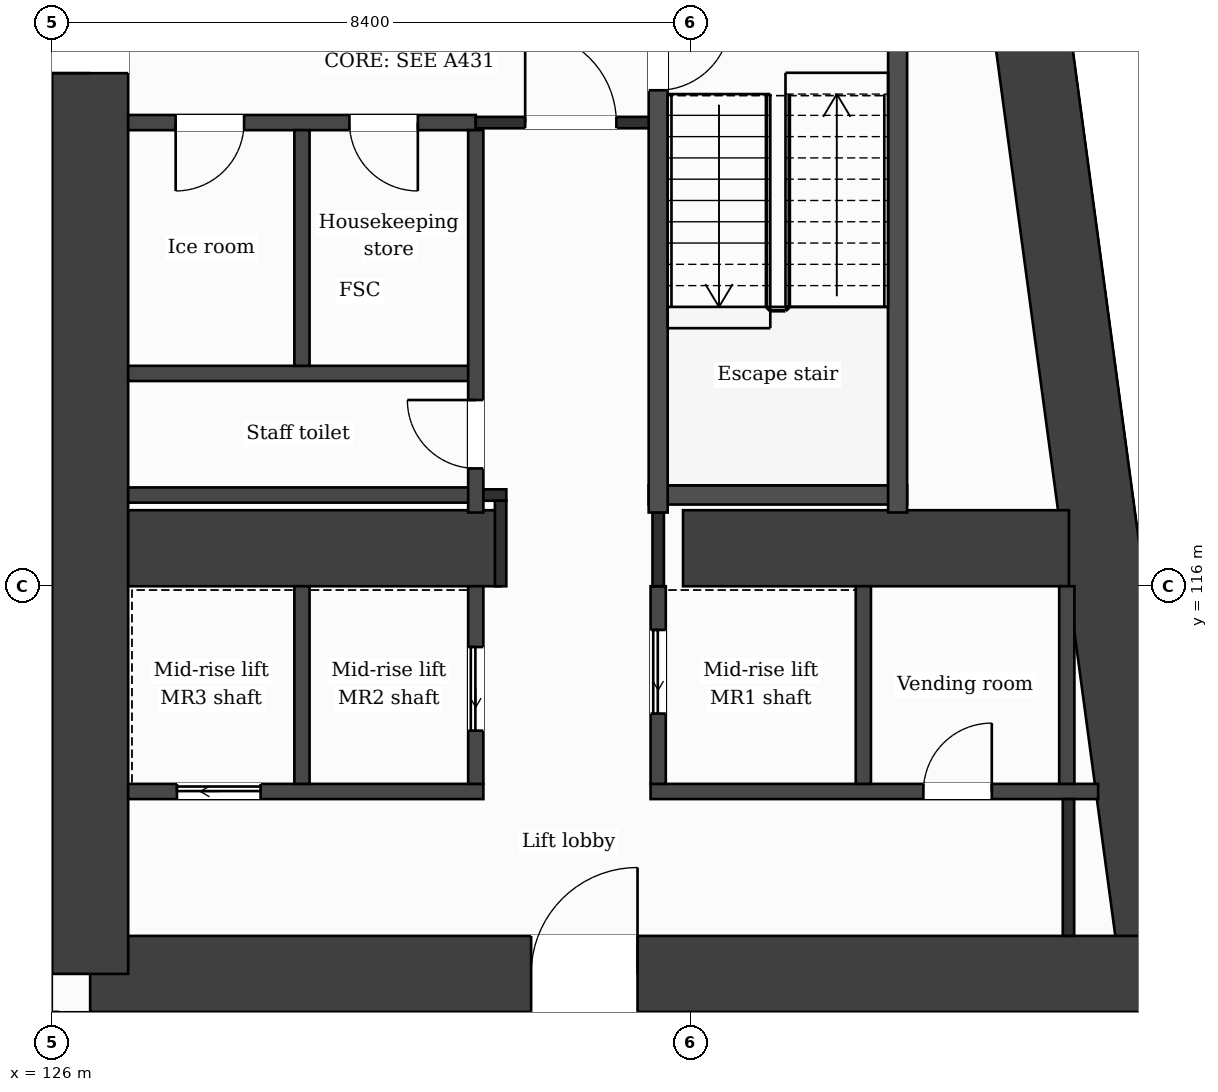
"""IFC4 building model, lengths in metres.
Left out: names, types, materials, properties, quantities, classifications, styles, units other than length and angle.
Written with IfcOpenShell. Run it as: python <this file> out.ifc"""

import sys

from ifc_helpers import new_model, si_unit, direction, frame, frame_2d, origin, place, context, subcontext, project, spatial, rectangle, extrude, element, fill, save


model = new_model("IFC4")
c1 = context("Model", 3, precision=1e-05, world=origin(), true_north=direction((0.0, 1.0)))
c2 = subcontext(c1, "Body", "Model", "MODEL_VIEW")
j1 = project(units=[si_unit("LENGTHUNIT", "METRE"), si_unit("PLANEANGLEUNIT", "RADIAN")], contexts=[c1])
p1 = place(None, origin())
s1 = spatial("IfcSite", under=j1, at=p1, CompositionType="ELEMENT")
p2 = place(p1, origin())
s2 = spatial("IfcBuilding", under=s1, at=p2, CompositionType="ELEMENT")
p3 = place(p2, frame((0.0, 0.0, 128.0)))
s3 = spatial("IfcBuildingStorey", under=s2, at=p3, CompositionType="ELEMENT", Elevation=128.0)
p4 = place(p3, frame((137.732, 131.9, 0.0), z_axis=(0.0, 0.0, 1.0), x_axis=(0.133411141623, -0.991060778808, 0.0)))
e1 = element("IfcWall", 1, at=p4, inside=s3, PredefinedType="SHEAR", context=c2, shape_type="SweptSolid", body=[
    extrude(rectangle(XDim=21.189, YDim=1.0, at=frame_2d((10.595, 0.0))), origin(), (0.0, 0.0, 1.0), 3.7),
])
p5 = place(p3, frame((140.559, 110.9, 0.0), z_axis=(0.0, 0.0, 1.0), x_axis=(-1.0, 0.0, 0.0)))
e2 = element("IfcWall", 2, at=p5, inside=s3, PredefinedType="SHEAR", context=c2, shape_type="SweptSolid", body=[
    extrude(rectangle(XDim=14.059, YDim=1.0, at=frame_2d((7.029, 0.0))), origin(), (0.0, 0.0, 1.0), 3.7),
])
p6 = place(p5, frame((6.858, 0.0, 0.0)))
e3 = element("IfcOpeningElement", 3, at=p6, cuts=e2, PredefinedType="OPENING", context=c2, shape_type="SweptSolid", body=[
    extrude(rectangle(XDim=1.4, YDim=2.1, at=frame_2d((0.7, 1.05))), frame((0.0, 0.51, 0.0), z_axis=(0.0, -1.0, 0.0), x_axis=(1.0, 0.0, 0.0)), (0.0, 0.0, 1.0), 1.02),
])
p7 = place(p3, frame((126.5, 110.9, 0.0), z_axis=(0.0, 0.0, 1.0), x_axis=(0.0, 1.0, 0.0)))
e4 = element("IfcWall", 4, at=p7, inside=s3, PredefinedType="SHEAR", context=c2, shape_type="SweptSolid", body=[
    extrude(rectangle(XDim=21.0, YDim=1.0, at=frame_2d((10.5, 0.0))), origin(), (0.0, 0.0, 1.0), 3.7),
])
p8 = place(p7, frame((11.85, 0.0, 0.0)))
e5 = element("IfcOpeningElement", 5, at=p8, cuts=e4, PredefinedType="OPENING", context=c2, shape_type="SweptSolid", body=[
    extrude(rectangle(XDim=1.4, YDim=2.1, at=frame_2d((0.7, 1.05))), frame((0.0, 0.51, 0.0), z_axis=(0.0, -1.0, 0.0), x_axis=(1.0, 0.0, 0.0)), (0.0, 0.0, 1.0), 1.02),
])
p9 = place(p3, frame((127.0, 116.5, 0.0), z_axis=(0.0, 0.0, 1.0), x_axis=(1.0, 0.0, 0.0)))
e6 = element("IfcWall", 6, at=p9, inside=s3, PredefinedType="SHEAR", context=c2, shape_type="SweptSolid", body=[
    extrude(rectangle(XDim=4.9, YDim=1.0, at=frame_2d((2.45, 0.0))), origin(), (0.0, 0.0, 1.0), 3.7),
])
p10 = place(p3, frame((134.3, 116.5, 0.0), z_axis=(0.0, 0.0, 1.0), x_axis=(1.0, 0.0, 0.0)))
e7 = element("IfcWall", 7, at=p10, inside=s3, PredefinedType="SHEAR", context=c2, shape_type="SweptSolid", body=[
    extrude(rectangle(XDim=5.077, YDim=1.0, at=frame_2d((2.539, 0.0))), origin(), (0.0, 0.0, 1.0), 3.7),
])
p11 = place(p3, frame((140.348, 103.85, 0.0), z_axis=(0.0, 0.0, 1.0), x_axis=(-0.133431549479, 0.991058031401, 0.0)))
e8 = element("IfcWall", 8, at=p11, inside=s3, PredefinedType="SOLIDWALL", context=c2, shape_type="SweptSolid", body=[
    extrude(rectangle(XDim=6.609, YDim=0.3, at=frame_2d((3.304, 0.0))), origin(), (0.0, 0.0, 1.0), 3.38),
])
p12 = place(p11, frame((0.737, 0.0, 0.9)))
e9 = element("IfcOpeningElement", 9, at=p12, cuts=e8, PredefinedType="OPENING", context=c2, shape_type="SweptSolid", body=[
    extrude(rectangle(XDim=1.2, YDim=2.1, at=frame_2d((0.6, 1.05))), frame((0.0, 0.16, 0.0), z_axis=(0.0, -1.0, 0.0), x_axis=(1.0, 0.0, 0.0)), (0.0, 0.0, 1.0), 0.32),
])
p13 = place(p11, frame((3.991, 0.0, 0.0)))
e10 = element("IfcOpeningElement", 10, at=p13, cuts=e8, PredefinedType="OPENING", context=c2, shape_type="SweptSolid", body=[
    extrude(rectangle(XDim=1.2, YDim=2.4, at=frame_2d((0.6, 1.2))), frame((0.0, 0.16, 0.0), z_axis=(0.0, -1.0, 0.0), x_axis=(1.0, 0.0, 0.0)), (0.0, 0.0, 1.0), 0.32),
])
p14 = place(p3, frame((127.0, 113.3, 0.0), z_axis=(0.0, 0.0, 1.0), x_axis=(1.0, 0.0, 0.0)))
e11 = element("IfcWall", 11, at=p14, inside=s3, PredefinedType="PARTITIONING", context=c2, shape_type="SweptSolid", body=[
    extrude(rectangle(XDim=4.673, YDim=0.2, at=frame_2d((2.336, 0.0))), origin(), (0.0, 0.0, 1.0), 3.38),
])
p15 = place(p14, frame((0.642, 0.0, 0.0)))
e12 = element("IfcOpeningElement", 12, at=p15, cuts=e11, PredefinedType="OPENING", context=c2, shape_type="SweptSolid", body=[
    extrude(rectangle(XDim=1.1, YDim=2.1, at=frame_2d((0.55, 1.05))), frame((0.0, 0.11, 0.0), z_axis=(0.0, -1.0, 0.0), x_axis=(1.0, 0.0, 0.0)), (0.0, 0.0, 1.0), 0.22),
])
p16 = place(p3, frame((133.873, 113.3, 0.0), z_axis=(0.0, 0.0, 1.0), x_axis=(1.0, 0.0, 0.0)))
e13 = element("IfcWall", 13, at=p16, inside=s3, PredefinedType="PARTITIONING", context=c2, shape_type="SweptSolid", body=[
    extrude(rectangle(XDim=5.888, YDim=0.2, at=frame_2d((2.944, 0.0))), origin(), (0.0, 0.0, 1.0), 3.38),
])
p17 = place(p16, frame((3.589, 0.0, 0.0)))
e14 = element("IfcOpeningElement", 14, at=p17, cuts=e13, PredefinedType="OPENING", context=c2, shape_type="SweptSolid", body=[
    extrude(rectangle(XDim=0.9, YDim=2.1, at=frame_2d((0.45, 1.05))), frame((0.0, 0.11, 0.0), z_axis=(0.0, -1.0, 0.0), x_axis=(1.0, 0.0, 0.0)), (0.0, 0.0, 1.0), 0.22),
])
p18 = place(p3, frame((127.0, 117.2, 0.0), z_axis=(0.0, 0.0, 1.0), x_axis=(1.0, 0.0, 0.0)))
e15 = element("IfcWall", 15, at=p18, inside=s3, PredefinedType="PARTITIONING", context=c2, shape_type="SweptSolid", body=[
    extrude(rectangle(XDim=4.573, YDim=0.2, at=frame_2d((2.287, 0.0))), origin(), (0.0, 0.0, 1.0), 3.38),
])
p19 = place(p3, frame((131.573, 117.2, 0.0), z_axis=(0.0, 0.0, 1.0), x_axis=(1.0, 0.0, 0.0)))
e16 = element("IfcWall", 16, at=p19, inside=s3, PredefinedType="PARTITIONING", context=c2, shape_type="SweptSolid", body=[
    extrude(rectangle(XDim=0.402, YDim=0.15, at=frame_2d((0.201, 0.0))), origin(), (0.0, 0.0, 1.0), 3.38),
])
p20 = place(p3, frame((133.848, 117.2, 0.0), z_axis=(0.0, 0.0, 1.0), x_axis=(1.0, 0.0, 0.0)))
e17 = element("IfcWall", 17, at=p20, inside=s3, PredefinedType="PARTITIONING", context=c2, shape_type="SweptSolid", body=[
    extrude(rectangle(XDim=3.4, YDim=0.25, at=frame_2d((1.7, 0.0))), origin(), (0.0, 0.0, 1.0), 3.38),
])
p21 = place(p3, frame((127.0, 118.8, 0.0), z_axis=(0.0, 0.0, 1.0), x_axis=(1.0, 0.0, 0.0)))
e18 = element("IfcWall", 18, at=p21, inside=s3, PredefinedType="PARTITIONING", context=c2, shape_type="SweptSolid", body=[
    extrude(rectangle(XDim=4.573, YDim=0.2, at=frame_2d((2.287, 0.0))), origin(), (0.0, 0.0, 1.0), 3.38),
])
p22 = place(p3, frame((127.0, 122.1, 0.0), z_axis=(0.0, 0.0, 1.0), x_axis=(1.0, 0.0, 0.0)))
e19 = element("IfcWall", 19, at=p22, inside=s3, PredefinedType="PARTITIONING", context=c2, shape_type="SweptSolid", body=[
    extrude(rectangle(XDim=4.573, YDim=0.2, at=frame_2d((2.287, 0.0))), origin(), (0.0, 0.0, 1.0), 3.38),
])
p23 = place(p22, frame((2.911, 0.0, 0.0)))
e20 = element("IfcOpeningElement", 20, at=p23, cuts=e19, PredefinedType="OPENING", context=c2, shape_type="SweptSolid", body=[
    extrude(rectangle(XDim=0.9, YDim=2.1, at=frame_2d((0.45, 1.05))), frame((0.0, 0.11, 0.0), z_axis=(0.0, -1.0, 0.0), x_axis=(1.0, 0.0, 0.0)), (0.0, 0.0, 1.0), 0.22),
])
p24 = place(p22, frame((0.625, 0.0, 0.0)))
e21 = element("IfcOpeningElement", 21, at=p24, cuts=e19, PredefinedType="OPENING", context=c2, shape_type="SweptSolid", body=[
    extrude(rectangle(XDim=0.9, YDim=2.1, at=frame_2d((0.45, 1.05))), frame((0.0, 0.11, 0.0), z_axis=(0.0, -1.0, 0.0), x_axis=(1.0, 0.0, 0.0)), (0.0, 0.0, 1.0), 0.22),
])
p25 = place(p3, frame((131.573, 122.1, 0.0), z_axis=(0.0, 0.0, 1.0), x_axis=(1.0, 0.0, 0.0)))
e22 = element("IfcWall", 22, at=p25, inside=s3, PredefinedType="PARTITIONING", context=c2, shape_type="SweptSolid", body=[
    extrude(rectangle(XDim=2.4, YDim=0.15, at=frame_2d((1.2, 0.0))), origin(), (0.0, 0.0, 1.0), 3.38),
])
p26 = place(p25, frame((0.65, 0.0, 0.0)))
e23 = element("IfcOpeningElement", 23, at=p26, cuts=e22, PredefinedType="OPENING", context=c2, shape_type="SweptSolid", body=[
    extrude(rectangle(XDim=1.2, YDim=2.1, at=frame_2d((0.6, 1.05))), frame((0.0, 0.085, 0.0), z_axis=(0.0, -1.0, 0.0), x_axis=(1.0, 0.0, 0.0)), (0.0, 0.0, 1.0), 0.17),
])
p27 = place(p3, frame((100.8, 122.45, 0.0), z_axis=(0.0, 0.0, 1.0), x_axis=(1.0, 0.0, 0.0)))
e24 = element("IfcWall", 24, at=p27, inside=s3, PredefinedType="PARTITIONING", context=c2, shape_type="SweptSolid", body=[
    extrude(rectangle(XDim=25.2, YDim=0.15, at=frame_2d((12.6, 0.0))), origin(), (0.0, 0.0, 1.0), 3.38),
])
p28 = place(p3, frame((126.0, 109.075, 0.0), z_axis=(0.0, 0.0, 1.0), x_axis=(0.0, 1.0, 0.0)))
e25 = element("IfcWall", 25, at=p28, inside=s3, PredefinedType="PARTITIONING", context=c2, shape_type="SweptSolid", body=[
    extrude(rectangle(XDim=1.325, YDim=0.15, at=frame_2d((0.663, 0.0))), origin(), (0.0, 0.0, 1.0), 3.38),
])
p29 = place(p3, frame((129.287, 113.4, 0.0), z_axis=(0.0, 0.0, 1.0), x_axis=(0.0, 1.0, 0.0)))
e26 = element("IfcWall", 26, at=p29, inside=s3, PredefinedType="PARTITIONING", context=c2, shape_type="SweptSolid", body=[
    extrude(rectangle(XDim=2.6, YDim=0.2, at=frame_2d((1.3, 0.0))), origin(), (0.0, 0.0, 1.0), 3.38),
])
p30 = place(p3, frame((129.287, 118.9, 0.0), z_axis=(0.0, 0.0, 1.0), x_axis=(0.0, 1.0, 0.0)))
e27 = element("IfcWall", 27, at=p30, inside=s3, PredefinedType="PARTITIONING", context=c2, shape_type="SweptSolid", body=[
    extrude(rectangle(XDim=3.1, YDim=0.2, at=frame_2d((1.55, 0.0))), origin(), (0.0, 0.0, 1.0), 3.38),
])
p31 = place(p3, frame((131.573, 113.4, 0.0), z_axis=(0.0, 0.0, 1.0), x_axis=(0.0, 1.0, 0.0)))
e28 = element("IfcWall", 28, at=p31, inside=s3, PredefinedType="PARTITIONING", context=c2, shape_type="SweptSolid", body=[
    extrude(rectangle(XDim=2.6, YDim=0.2, at=frame_2d((1.3, 0.0))), origin(), (0.0, 0.0, 1.0), 3.38),
])
p32 = place(p31, frame((0.7, 0.0, 0.0)))
e29 = element("IfcOpeningElement", 29, at=p32, cuts=e28, PredefinedType="OPENING", context=c2, shape_type="SweptSolid", body=[
    extrude(rectangle(XDim=1.1, YDim=2.1, at=frame_2d((0.55, 1.05))), frame((0.0, 0.11, 0.0), z_axis=(0.0, -1.0, 0.0), x_axis=(1.0, 0.0, 0.0)), (0.0, 0.0, 1.0), 0.22),
])
p33 = place(p3, frame((131.573, 116.97, 0.0), z_axis=(0.0, 0.0, 1.0), x_axis=(0.0, 1.0, 0.0)))
e30 = element("IfcWall", 30, at=p33, inside=s3, PredefinedType="PARTITIONING", context=c2, shape_type="SweptSolid", body=[
    extrude(rectangle(XDim=5.03, YDim=0.2, at=frame_2d((2.515, 0.0))), origin(), (0.0, 0.0, 1.0), 3.38),
])
p34 = place(p33, frame((0.58, 0.0, 0.0)))
e31 = element("IfcOpeningElement", 31, at=p34, cuts=e30, PredefinedType="OPENING", context=c2, shape_type="SweptSolid", body=[
    extrude(rectangle(XDim=0.9, YDim=2.1, at=frame_2d((0.45, 1.05))), frame((0.0, 0.11, 0.0), z_axis=(0.0, -1.0, 0.0), x_axis=(1.0, 0.0, 0.0)), (0.0, 0.0, 1.0), 0.22),
])
p35 = place(p3, frame((131.9, 116.0, 0.0), z_axis=(0.0, 0.0, 1.0), x_axis=(0.0, 1.0, 0.0)))
e32 = element("IfcWall", 32, at=p35, inside=s3, PredefinedType="PARTITIONING", context=c2, shape_type="SweptSolid", body=[
    extrude(rectangle(XDim=1.125, YDim=0.15, at=frame_2d((0.562, 0.0))), origin(), (0.0, 0.0, 1.0), 3.38),
])
p36 = place(p3, frame((133.973, 113.4, 0.0), z_axis=(0.0, 0.0, 1.0), x_axis=(0.0, 1.0, 0.0)))
e33 = element("IfcWall", 33, at=p36, inside=s3, PredefinedType="PARTITIONING", context=c2, shape_type="SweptSolid", body=[
    extrude(rectangle(XDim=2.6, YDim=0.2, at=frame_2d((1.3, 0.0))), origin(), (0.0, 0.0, 1.0), 3.38),
])
p37 = place(p36, frame((0.925, 0.0, 0.0)))
e34 = element("IfcOpeningElement", 34, at=p37, cuts=e33, PredefinedType="OPENING", context=c2, shape_type="SweptSolid", body=[
    extrude(rectangle(XDim=1.1, YDim=2.1, at=frame_2d((0.55, 1.05))), frame((0.0, 0.11, 0.0), z_axis=(0.0, -1.0, 0.0), x_axis=(1.0, 0.0, 0.0)), (0.0, 0.0, 1.0), 0.22),
])
p38 = place(p3, frame((133.973, 116.0, 0.0), z_axis=(0.0, 0.0, 1.0), x_axis=(0.0, 1.0, 0.0)))
e35 = element("IfcWall", 35, at=p38, inside=s3, PredefinedType="PARTITIONING", context=c2, shape_type="SweptSolid", body=[
    extrude(rectangle(XDim=0.97, YDim=0.15, at=frame_2d((0.485, 0.0))), origin(), (0.0, 0.0, 1.0), 3.38),
])
p39 = place(p3, frame((133.973, 116.97, 0.0), z_axis=(0.0, 0.0, 1.0), x_axis=(0.0, 1.0, 0.0)))
e36 = element("IfcWall", 36, at=p39, inside=s3, PredefinedType="PARTITIONING", context=c2, shape_type="SweptSolid", body=[
    extrude(rectangle(XDim=6.855, YDim=0.25, at=frame_2d((3.427, 0.0))), origin(), (0.0, 0.0, 1.0), 3.38),
])
p40 = place(p39, frame((5.555, 0.0, 0.0)))
e37 = element("IfcOpeningElement", 37, at=p40, cuts=e36, PredefinedType="OPENING", context=c2, shape_type="SweptSolid", body=[
    extrude(rectangle(XDim=0.95, YDim=2.1, at=frame_2d((0.475, 1.05))), frame((0.0, 0.135, 0.0), z_axis=(0.0, -1.0, 0.0), x_axis=(1.0, 0.0, 0.0)), (0.0, 0.0, 1.0), 0.27),
])
p41 = place(p3, frame((136.672, 113.4, 0.0), z_axis=(0.0, 0.0, 1.0), x_axis=(0.0, 1.0, 0.0)))
e38 = element("IfcWall", 38, at=p41, inside=s3, PredefinedType="PARTITIONING", context=c2, shape_type="SweptSolid", body=[
    extrude(rectangle(XDim=2.6, YDim=0.2, at=frame_2d((1.3, 0.0))), origin(), (0.0, 0.0, 1.0), 3.38),
])
p42 = place(p3, frame((137.123, 116.97, 0.0), z_axis=(0.0, 0.0, 1.0), x_axis=(0.0, 1.0, 0.0)))
e39 = element("IfcWall", 39, at=p42, inside=s3, PredefinedType="PARTITIONING", context=c2, shape_type="SweptSolid", body=[
    extrude(rectangle(XDim=6.855, YDim=0.25, at=frame_2d((3.427, 0.0))), origin(), (0.0, 0.0, 1.0), 3.38),
])
p43 = place(p3, frame((139.349, 113.4, 0.0), z_axis=(0.0, 0.0, 1.0), x_axis=(0.0, 1.0, 0.0)))
e40 = element("IfcWall", 40, at=p43, inside=s3, PredefinedType="PARTITIONING", context=c2, shape_type="SweptSolid", body=[
    extrude(rectangle(XDim=2.6, YDim=0.2, at=frame_2d((1.3, 0.0))), origin(), (0.0, 0.0, 1.0), 3.38),
])
p44 = place(p3, frame((139.371, 111.4, 0.0), z_axis=(0.0, 0.0, 1.0), x_axis=(0.0, 1.0, 0.0)))
e41 = element("IfcWall", 41, at=p44, inside=s3, PredefinedType="PARTITIONING", context=c2, shape_type="SweptSolid", body=[
    extrude(rectangle(XDim=1.8, YDim=0.15, at=frame_2d((0.9, 0.0))), origin(), (0.0, 0.0, 1.0), 3.38),
])
p45 = place(p26, origin())
e42 = element("IfcDoor", 42, at=p45, inside=s3, OperationType="SINGLE_SWING_LEFT", PredefinedType="DOOR", context=c2, shape_type="SweptSolid", body=[
    extrude(rectangle(XDim=1.2, YDim=2.1, at=frame_2d((0.6, 1.05))), frame((0.0, 0.025, 0.0), z_axis=(0.0, -1.0, 0.0), x_axis=(1.0, 0.0, 0.0)), (0.0, 0.0, 1.0), 0.05),
])
fill(e23, e42)
p46 = place(p23, origin())
e43 = element("IfcDoor", 43, at=p46, inside=s3, OperationType="SINGLE_SWING_RIGHT", PredefinedType="DOOR", context=c2, shape_type="SweptSolid", body=[
    extrude(rectangle(XDim=0.9, YDim=2.1, at=frame_2d((0.45, 1.05))), frame((0.0, 0.025, 0.0), z_axis=(0.0, -1.0, 0.0), x_axis=(1.0, 0.0, 0.0)), (0.0, 0.0, 1.0), 0.05),
])
fill(e20, e43)
p47 = place(p24, origin())
e44 = element("IfcDoor", 44, at=p47, inside=s3, OperationType="SINGLE_SWING_LEFT", PredefinedType="DOOR", context=c2, shape_type="SweptSolid", body=[
    extrude(rectangle(XDim=0.9, YDim=2.1, at=frame_2d((0.45, 1.05))), frame((0.0, 0.025, 0.0), z_axis=(0.0, -1.0, 0.0), x_axis=(1.0, 0.0, 0.0)), (0.0, 0.0, 1.0), 0.05),
])
fill(e21, e44)
p48 = place(p40, origin())
e45 = element("IfcDoor", 45, at=p48, inside=s3, OperationType="SINGLE_SWING_RIGHT", PredefinedType="DOOR", context=c2, shape_type="SweptSolid", body=[
    extrude(rectangle(XDim=0.95, YDim=2.1, at=frame_2d((0.475, 1.05))), frame((0.0, 0.025, 0.0), z_axis=(0.0, -1.0, 0.0), x_axis=(1.0, 0.0, 0.0)), (0.0, 0.0, 1.0), 0.05),
])
fill(e37, e45)
p49 = place(p34, origin())
e46 = element("IfcDoor", 46, at=p49, inside=s3, OperationType="SINGLE_SWING_RIGHT", PredefinedType="DOOR", context=c2, shape_type="SweptSolid", body=[
    extrude(rectangle(XDim=0.9, YDim=2.1, at=frame_2d((0.45, 1.05))), frame((0.0, 0.025, 0.0), z_axis=(0.0, -1.0, 0.0), x_axis=(1.0, 0.0, 0.0)), (0.0, 0.0, 1.0), 0.05),
])
fill(e31, e46)
p50 = place(p37, origin())
e47 = element("IfcDoor", 47, at=p50, inside=s3, OperationType="SLIDING_TO_LEFT", PredefinedType="DOOR", context=c2, shape_type="SweptSolid", body=[
    extrude(rectangle(XDim=1.1, YDim=2.1, at=frame_2d((0.55, 1.05))), frame((0.0, 0.025, 0.0), z_axis=(0.0, -1.0, 0.0), x_axis=(1.0, 0.0, 0.0)), (0.0, 0.0, 1.0), 0.05),
])
fill(e34, e47)
p51 = place(p32, origin())
e48 = element("IfcDoor", 48, at=p51, inside=s3, OperationType="SLIDING_TO_LEFT", PredefinedType="DOOR", context=c2, shape_type="SweptSolid", body=[
    extrude(rectangle(XDim=1.1, YDim=2.1, at=frame_2d((0.55, 1.05))), frame((0.0, 0.025, 0.0), z_axis=(0.0, -1.0, 0.0), x_axis=(1.0, 0.0, 0.0)), (0.0, 0.0, 1.0), 0.05),
])
fill(e29, e48)
p52 = place(p15, origin())
e49 = element("IfcDoor", 49, at=p52, inside=s3, OperationType="SLIDING_TO_LEFT", PredefinedType="DOOR", context=c2, shape_type="SweptSolid", body=[
    extrude(rectangle(XDim=1.1, YDim=2.1, at=frame_2d((0.55, 1.05))), frame((0.0, 0.025, 0.0), z_axis=(0.0, -1.0, 0.0), x_axis=(1.0, 0.0, 0.0)), (0.0, 0.0, 1.0), 0.05),
])
fill(e12, e49)
p53 = place(p17, origin())
e50 = element("IfcDoor", 50, at=p53, inside=s3, OperationType="SINGLE_SWING_RIGHT", PredefinedType="DOOR", context=c2, shape_type="SweptSolid", body=[
    extrude(rectangle(XDim=0.9, YDim=2.1, at=frame_2d((0.45, 1.05))), frame((0.0, 0.025, 0.0), z_axis=(0.0, -1.0, 0.0), x_axis=(1.0, 0.0, 0.0)), (0.0, 0.0, 1.0), 0.05),
])
fill(e14, e50)
p54 = place(p6, origin())
e51 = element("IfcDoor", 51, at=p54, inside=s3, OperationType="SINGLE_SWING_LEFT", PredefinedType="DOOR", context=c2, shape_type="SweptSolid", body=[
    extrude(rectangle(XDim=1.4, YDim=2.1, at=frame_2d((0.7, 1.05))), frame((0.0, 0.025, 0.0), z_axis=(0.0, -1.0, 0.0), x_axis=(1.0, 0.0, 0.0)), (0.0, 0.0, 1.0), 0.05),
])
fill(e3, e51)
p55 = place(p8, origin())
e52 = element("IfcDoor", 52, at=p55, inside=s3, OperationType="SINGLE_SWING_LEFT", PredefinedType="DOOR", context=c2, shape_type="SweptSolid", body=[
    extrude(rectangle(XDim=1.4, YDim=2.1, at=frame_2d((0.7, 1.05))), frame((0.0, 0.025, 0.0), z_axis=(0.0, -1.0, 0.0), x_axis=(1.0, 0.0, 0.0)), (0.0, 0.0, 1.0), 0.05),
])
fill(e5, e52)
save(model, sys.argv[1])
